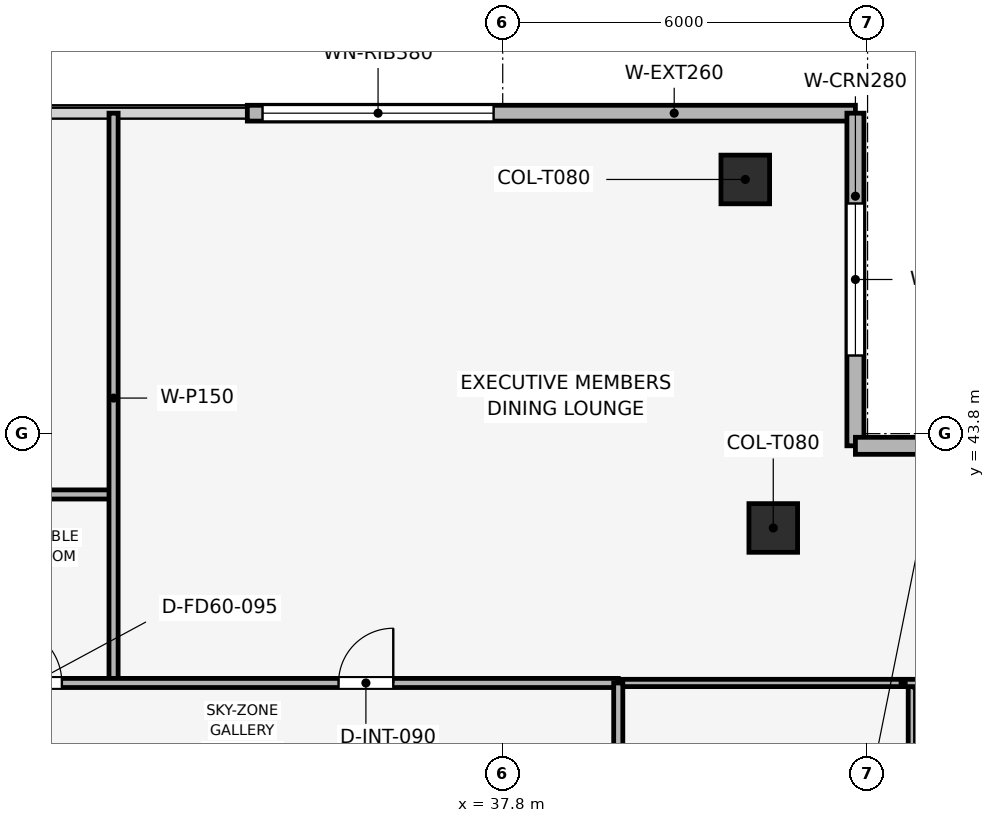
"""IFC4 building model, lengths in metres.
Left out: names, types, materials, properties, quantities, classifications, styles, units other than length and angle.
Written with IfcOpenShell. Run it as: python <this file> out.ifc"""

import sys

from ifc_helpers import new_model, si_unit, direction, frame, frame_2d, origin, origin_2d, place, context, subcontext, project, spatial, rectangle, extrude, element, fill, save


model = new_model("IFC4")
c1 = context("Model", 3, precision=1e-05, world=origin(), true_north=direction((0.0, 1.0)))
c2 = subcontext(c1, "Body", "Model", "MODEL_VIEW")
j1 = project(units=[si_unit("LENGTHUNIT", "METRE"), si_unit("PLANEANGLEUNIT", "RADIAN")], contexts=[c1])
p1 = place(None, origin())
s1 = spatial("IfcSite", under=j1, at=p1, CompositionType="ELEMENT")
p2 = place(p1, origin())
s2 = spatial("IfcBuilding", under=s1, at=p2, CompositionType="ELEMENT")
p3 = place(p2, frame((0.0, 0.0, 364.5)))
s3 = spatial("IfcBuildingStorey", under=s2, at=p3, CompositionType="ELEMENT", Elevation=364.5)
p4 = place(p3, frame((41.789, 47.98, 0.051), z_axis=(-0.202047238794, -0.363749581663, 0.909320160964), x_axis=(0.874193862425, -0.485577069989, 0.0)))
e1 = element("IfcColumn", 1, at=p4, inside=s3, PredefinedType="COLUMN", context=c2, shape_type="SweptSolid", body=[
    extrude(rectangle(XDim=0.8, YDim=0.8, at=origin_2d()), origin(), (0.0, 0.0, 1.0), 4.539),
])
p5 = place(p3, frame((42.249, 42.249, 0.005), z_axis=(-0.212111933046, -0.212111933046, 0.953948141001), x_axis=(0.707106781187, -0.707106781187, 0.0)))
e2 = element("IfcColumn", 2, at=p5, inside=s3, PredefinedType="COLUMN", context=c2, shape_type="SweptSolid", body=[
    extrude(rectangle(XDim=0.8, YDim=0.8, at=origin_2d()), origin(), (0.0, 0.0, 1.0), 4.395),
])
p6 = place(p3, frame((33.6, 49.07, 0.0), z_axis=(0.0, 0.0, 1.0), x_axis=(1.0, 0.0, 0.0)))
e3 = element("IfcWall", 3, at=p6, inside=s3, PredefinedType="SOLIDWALL", context=c2, shape_type="SweptSolid", body=[
    extrude(rectangle(XDim=10.0, YDim=0.26, at=frame_2d((5.0, 0.0))), origin(), (0.0, 0.0, 1.0), 4.2),
])
p7 = place(p6, frame((0.25, 0.0, 0.9)))
e4 = element("IfcOpeningElement", 4, at=p7, cuts=e3, PredefinedType="OPENING", context=c2, shape_type="SweptSolid", body=[
    extrude(rectangle(XDim=3.8, YDim=1.9, at=frame_2d((1.9, 0.95))), frame((0.0, 0.14, 0.0), z_axis=(0.0, -1.0, 0.0), x_axis=(1.0, 0.0, 0.0)), (0.0, 0.0, 1.0), 0.28),
])
p8 = place(p3, frame((43.6, 49.07, 0.0), z_axis=(0.0, 0.0, 1.0), x_axis=(0.0, -1.0, 0.0)))
e5 = element("IfcWall", 5, at=p8, inside=s3, PredefinedType="SOLIDWALL", context=c2, shape_type="SweptSolid", body=[
    extrude(rectangle(XDim=5.47, YDim=0.28, at=frame_2d((2.735, 0.0))), origin(), (0.0, 0.0, 1.0), 4.2),
])
p9 = place(p8, frame((1.485, 0.0, 0.9)))
e6 = element("IfcOpeningElement", 6, at=p9, cuts=e5, PredefinedType="OPENING", context=c2, shape_type="SweptSolid", body=[
    extrude(rectangle(XDim=2.5, YDim=1.9, at=frame_2d((1.25, 0.95))), frame((0.0, 0.15, 0.0), z_axis=(0.0, -1.0, 0.0), x_axis=(1.0, 0.0, 0.0)), (0.0, 0.0, 1.0), 0.3),
])
p10 = place(p3, frame((43.6, 43.6, 0.0), z_axis=(0.0, 0.0, 1.0), x_axis=(1.0, 0.0, 0.0)))
e7 = element("IfcWall", 7, at=p10, inside=s3, PredefinedType="SOLIDWALL", context=c2, shape_type="SweptSolid", body=[
    extrude(rectangle(XDim=5.47, YDim=0.28, at=frame_2d((2.735, 0.0))), origin(), (0.0, 0.0, 1.0), 4.2),
])
p11 = place(p10, frame((1.485, 0.0, 0.9)))
e8 = element("IfcOpeningElement", 8, at=p11, cuts=e7, PredefinedType="OPENING", context=c2, shape_type="SweptSolid", body=[
    extrude(rectangle(XDim=2.5, YDim=1.9, at=frame_2d((1.25, 0.95))), frame((0.0, 0.15, 0.0), z_axis=(0.0, -1.0, 0.0), x_axis=(1.0, 0.0, 0.0)), (0.0, 0.0, 1.0), 0.3),
])
p12 = place(p3, frame((23.0, 42.8, 0.0), z_axis=(0.0, 0.0, 1.0), x_axis=(1.0, 0.0, 0.0)))
e9 = element("IfcWall", 9, at=p12, inside=s3, PredefinedType="PARTITIONING", context=c2, shape_type="SweptSolid", body=[
    extrude(rectangle(XDim=8.4, YDim=0.15, at=frame_2d((4.2, 0.0))), origin(), (0.0, 0.0, 1.0), 3.285),
])
p13 = place(p3, frame((31.4, 39.7, 0.0), z_axis=(0.0, 0.0, 1.0), x_axis=(0.0, 1.0, 0.0)))
e10 = element("IfcWall", 10, at=p13, inside=s3, PredefinedType="PARTITIONING", context=c2, shape_type="SweptSolid", body=[
    extrude(rectangle(XDim=9.37, YDim=0.15, at=frame_2d((4.685, 0.0))), origin(), (0.0, 0.0, 1.0), 3.825),
])
p14 = place(p3, frame((44.528, 24.4, 0.0), z_axis=(0.0, 0.0, 1.0), x_axis=(0.0, 1.0, 0.0)))
e11 = element("IfcWall", 11, at=p14, inside=s3, PredefinedType="PARTITIONING", context=c2, shape_type="SweptSolid", body=[
    extrude(rectangle(XDim=15.3, YDim=0.12, at=frame_2d((7.65, 0.0))), origin(), (0.0, 0.0, 1.0), 3.285),
])
p15 = place(p14, frame((10.117, 0.0, 0.0)))
e12 = element("IfcOpeningElement", 12, at=p15, cuts=e11, PredefinedType="OPENING", context=c2, shape_type="SweptSolid", body=[
    extrude(rectangle(XDim=0.9, YDim=2.1, at=frame_2d((0.45, 1.05))), frame((0.0, 0.07, 0.0), z_axis=(0.0, -1.0, 0.0), x_axis=(1.0, 0.0, 0.0)), (0.0, 0.0, 1.0), 0.14),
])
p16 = place(p3, frame((39.7, 39.7, 0.0), z_axis=(0.0, 0.0, 1.0), x_axis=(1.0, 0.0, 0.0)))
e13 = element("IfcWall", 13, at=p16, inside=s3, PredefinedType="PARTITIONING", context=c2, shape_type="SweptSolid", body=[
    extrude(rectangle(XDim=9.37, YDim=0.12, at=frame_2d((4.685, 0.0))), origin(), (0.0, 0.0, 1.0), 3.785),
])
p17 = place(p3, frame((17.9, 39.7, 0.0), z_axis=(0.0, 0.0, 1.0), x_axis=(1.0, 0.0, 0.0)))
e14 = element("IfcWall", 14, at=p17, inside=s3, PredefinedType="PARTITIONING", context=c2, shape_type="SweptSolid", body=[
    extrude(rectangle(XDim=21.8, YDim=0.15, at=frame_2d((10.9, 0.0))), origin(), (0.0, 0.0, 1.0), 3.285),
])
p18 = place(p17, frame((2.1, 0.0, 0.0)))
e15 = element("IfcOpeningElement", 15, at=p18, cuts=e14, PredefinedType="OPENING", context=c2, shape_type="SweptSolid", body=[
    extrude(rectangle(XDim=0.9, YDim=2.1, at=frame_2d((0.45, 1.05))), frame((0.0, 0.085, 0.0), z_axis=(0.0, -1.0, 0.0), x_axis=(1.0, 0.0, 0.0)), (0.0, 0.0, 1.0), 0.17),
])
p19 = place(p17, frame((6.05, 0.0, 0.0)))
e16 = element("IfcOpeningElement", 16, at=p19, cuts=e14, PredefinedType="OPENING", context=c2, shape_type="SweptSolid", body=[
    extrude(rectangle(XDim=0.9, YDim=2.1, at=frame_2d((0.45, 1.05))), frame((0.0, 0.085, 0.0), z_axis=(0.0, -1.0, 0.0), x_axis=(1.0, 0.0, 0.0)), (0.0, 0.0, 1.0), 0.17),
])
p20 = place(p17, frame((8.95, 0.0, 0.0)))
e17 = element("IfcOpeningElement", 17, at=p20, cuts=e14, PredefinedType="OPENING", context=c2, shape_type="SweptSolid", body=[
    extrude(rectangle(XDim=0.9, YDim=2.1, at=frame_2d((0.45, 1.05))), frame((0.0, 0.085, 0.0), z_axis=(0.0, -1.0, 0.0), x_axis=(1.0, 0.0, 0.0)), (0.0, 0.0, 1.0), 0.17),
])
p21 = place(p17, frame((11.7, 0.0, 0.0)))
e18 = element("IfcOpeningElement", 18, at=p21, cuts=e14, PredefinedType="OPENING", context=c2, shape_type="SweptSolid", body=[
    extrude(rectangle(XDim=0.95, YDim=2.1, at=frame_2d((0.475, 1.05))), frame((0.0, 0.085, 0.0), z_axis=(0.0, -1.0, 0.0), x_axis=(1.0, 0.0, 0.0)), (0.0, 0.0, 1.0), 0.17),
])
p22 = place(p17, frame((17.2, 0.0, 0.0)))
e19 = element("IfcOpeningElement", 19, at=p22, cuts=e14, PredefinedType="OPENING", context=c2, shape_type="SweptSolid", body=[
    extrude(rectangle(XDim=0.9, YDim=2.1, at=frame_2d((0.45, 1.05))), frame((0.0, 0.085, 0.0), z_axis=(0.0, -1.0, 0.0), x_axis=(1.0, 0.0, 0.0)), (0.0, 0.0, 1.0), 0.17),
])
p23 = place(p3, frame((39.7, 24.4, 0.0), z_axis=(0.0, 0.0, 1.0), x_axis=(0.0, 1.0, 0.0)))
e20 = element("IfcWall", 20, at=p23, inside=s3, PredefinedType="PARTITIONING", context=c2, shape_type="SweptSolid", body=[
    extrude(rectangle(XDim=15.3, YDim=0.15, at=frame_2d((7.65, 0.0))), origin(), (0.0, 0.0, 1.0), 3.285),
])
p24 = place(p23, frame((7.2, 0.0, 0.0)))
e21 = element("IfcOpeningElement", 21, at=p24, cuts=e20, PredefinedType="OPENING", context=c2, shape_type="SweptSolid", body=[
    extrude(rectangle(XDim=0.9, YDim=2.1, at=frame_2d((0.45, 1.05))), frame((0.0, 0.085, 0.0), z_axis=(0.0, -1.0, 0.0), x_axis=(1.0, 0.0, 0.0)), (0.0, 0.0, 1.0), 0.17),
])
p25 = place(p7, origin())
e22 = element("IfcWindow", 22, at=p25, inside=s3, PartitioningType="SINGLE_PANEL", PredefinedType="WINDOW", context=c2, shape_type="SweptSolid", body=[
    extrude(rectangle(XDim=3.8, YDim=1.9, at=frame_2d((1.9, 0.95))), frame((0.0, 0.03, 0.0), z_axis=(0.0, -1.0, 0.0), x_axis=(1.0, 0.0, 0.0)), (0.0, 0.0, 1.0), 0.06),
])
fill(e4, e22)
p26 = place(p9, origin())
e23 = element("IfcWindow", 23, at=p26, inside=s3, PartitioningType="SINGLE_PANEL", PredefinedType="WINDOW", context=c2, shape_type="SweptSolid", body=[
    extrude(rectangle(XDim=2.5, YDim=1.9, at=frame_2d((1.25, 0.95))), frame((0.0, 0.03, 0.0), z_axis=(0.0, -1.0, 0.0), x_axis=(1.0, 0.0, 0.0)), (0.0, 0.0, 1.0), 0.06),
])
fill(e6, e23)
p27 = place(p21, origin())
e24 = element("IfcDoor", 24, at=p27, inside=s3, OperationType="SINGLE_SWING_LEFT", PredefinedType="DOOR", context=c2, shape_type="SweptSolid", body=[
    extrude(rectangle(XDim=0.95, YDim=2.1, at=frame_2d((0.475, 1.05))), frame((0.0, 0.025, 0.0), z_axis=(0.0, -1.0, 0.0), x_axis=(1.0, 0.0, 0.0)), (0.0, 0.0, 1.0), 0.05),
])
fill(e18, e24)
p28 = place(p22, origin())
e25 = element("IfcDoor", 25, at=p28, inside=s3, OperationType="SINGLE_SWING_RIGHT", PredefinedType="DOOR", context=c2, shape_type="SweptSolid", body=[
    extrude(rectangle(XDim=0.9, YDim=2.1, at=frame_2d((0.45, 1.05))), frame((0.0, 0.025, 0.0), z_axis=(0.0, -1.0, 0.0), x_axis=(1.0, 0.0, 0.0)), (0.0, 0.0, 1.0), 0.05),
])
fill(e19, e25)
save(model, sys.argv[1])
